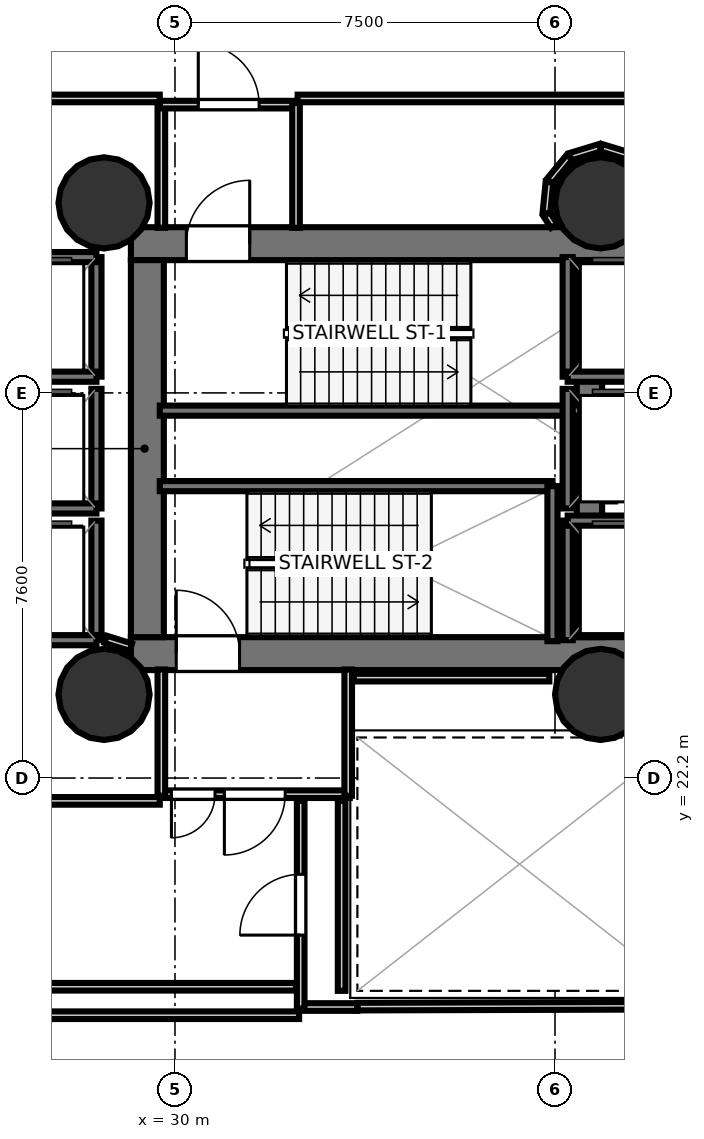
"""IFC4 building model, lengths in metres.
Left out: names, types, materials, properties, quantities, classifications, styles, units other than length and angle.
Written with IfcOpenShell. Run it as: python <this file> out.ifc"""

import sys

from ifc_helpers import new_model, si_unit, direction, frame, frame_2d, origin, origin_2d, place, context, subcontext, project, spatial, rectangle, hollow_circle, extrude, element, fill, save


model = new_model("IFC4")
c1 = context("Model", 3, precision=1e-05, world=origin(), true_north=direction((0.0, 1.0)))
c2 = subcontext(c1, "Body", "Model", "MODEL_VIEW")
j1 = project(units=[si_unit("LENGTHUNIT", "METRE"), si_unit("PLANEANGLEUNIT", "RADIAN")], contexts=[c1])
p1 = place(None, origin())
s1 = spatial("IfcSite", under=j1, at=p1, CompositionType="ELEMENT")
p2 = place(p1, origin())
s2 = spatial("IfcBuilding", under=s1, at=p2, CompositionType="ELEMENT")
p3 = place(p2, frame((0.0, 0.0, 47.9)))
s3 = spatial("IfcBuildingStorey", under=s2, at=p3, CompositionType="ELEMENT", Elevation=47.9)
p4 = place(p3, frame((29.13, 32.745, 0.0), z_axis=(0.0, 0.0, 1.0), x_axis=(1.0, 0.0, 0.0)))
e1 = element("IfcWall", 1, at=p4, inside=s3, PredefinedType="SHEAR", context=c2, shape_type="SweptSolid", body=[
    extrude(rectangle(XDim=10.72, YDim=0.65, at=frame_2d((5.36, 0.0))), origin(), (0.0, 0.0, 1.0), 4.42),
])
p5 = place(p4, frame((1.095, 0.0, 0.0)))
e2 = element("IfcOpeningElement", 2, at=p5, cuts=e1, PredefinedType="OPENING", context=c2, shape_type="SweptSolid", body=[
    extrude(rectangle(XDim=1.25, YDim=2.15, at=frame_2d((0.625, 1.075))), frame((0.0, 0.335, 0.0), z_axis=(0.0, -1.0, 0.0), x_axis=(1.0, 0.0, 0.0)), (0.0, 0.0, 1.0), 0.67),
])
p6 = place(p3, frame((29.13, 24.655, 0.0), z_axis=(0.0, 0.0, 1.0), x_axis=(1.0, 0.0, 0.0)))
e3 = element("IfcWall", 3, at=p6, inside=s3, PredefinedType="SHEAR", context=c2, shape_type="SweptSolid", body=[
    extrude(rectangle(XDim=10.72, YDim=0.65, at=frame_2d((5.36, 0.0))), origin(), (0.0, 0.0, 1.0), 4.42),
])
p7 = place(p6, frame((0.895, 0.0, 0.0)))
e4 = element("IfcOpeningElement", 4, at=p7, cuts=e3, PredefinedType="OPENING", context=c2, shape_type="SweptSolid", body=[
    extrude(rectangle(XDim=1.25, YDim=2.15, at=frame_2d((0.625, 1.075))), frame((0.0, 0.335, 0.0), z_axis=(0.0, -1.0, 0.0), x_axis=(1.0, 0.0, 0.0)), (0.0, 0.0, 1.0), 0.67),
])
p8 = place(p3, frame((29.455, 24.98, 0.0), z_axis=(0.0, 0.0, 1.0), x_axis=(0.0, 1.0, 0.0)))
e5 = element("IfcWall", 5, at=p8, inside=s3, PredefinedType="SHEAR", context=c2, shape_type="SweptSolid", body=[
    extrude(rectangle(XDim=7.44, YDim=0.65, at=frame_2d((3.72, 0.0))), origin(), (0.0, 0.0, 1.0), 4.42),
])
p9 = place(p3, frame((38.18, 24.98, 0.0), z_axis=(0.0, 0.0, 1.0), x_axis=(0.0, 1.0, 0.0)))
e6 = element("IfcWall", 6, at=p9, inside=s3, PredefinedType="SHEAR", context=c2, shape_type="SweptSolid", body=[
    extrude(rectangle(XDim=7.44, YDim=0.5, at=frame_2d((3.72, 0.0))), origin(), (0.0, 0.0, 1.0), 4.42),
])
for number, where, z_axis, x_axis in (
    (7, (28.6, 33.55, 0.0), (0.0, 0.0, 1.0), (1.0, 0.0, 0.0)),
    (8, (28.6, 23.85, 0.0), (0.0, 0.0, 1.0), (1.0, 0.0, 0.0)),
    (9, (38.4, 33.55, 0.0), (0.0, 0.0, 1.0), (1.0, 0.0, 0.0)),
    (10, (38.4, 23.85, 0.0), (0.0, 0.0, 1.0), (1.0, 0.0, 0.0)),
):
    element("IfcColumn", number, at=place(p3, frame(where, z_axis=z_axis, x_axis=x_axis)), inside=s3, PredefinedType="COLUMN", context=c2, shape_type="SweptSolid", body=[
        extrude(hollow_circle(Radius=0.9, WallThickness=0.045, at=origin_2d()), origin(), (0.0, 0.0, 1.0), 4.6),
    ])
p10 = place(p3, frame((29.7, 29.45, 0.0), z_axis=(0.0, 0.0, 1.0), x_axis=(1.0, 0.0, 0.0)))
e11 = element("IfcWall", 11, at=p10, inside=s3, PredefinedType="SOLIDWALL", context=c2, shape_type="SweptSolid", body=[
    extrude(rectangle(XDim=8.3, YDim=0.2, at=frame_2d((4.15, 0.0))), origin(), (0.0, 0.0, 1.0), 4.42),
])
p11 = place(p3, frame((29.7, 27.96, 0.0), z_axis=(0.0, 0.0, 1.0), x_axis=(1.0, 0.0, 0.0)))
e12 = element("IfcWall", 12, at=p11, inside=s3, PredefinedType="SOLIDWALL", context=c2, shape_type="SweptSolid", body=[
    extrude(rectangle(XDim=7.75, YDim=0.2, at=frame_2d((3.875, 0.0))), origin(), (0.0, 0.0, 1.0), 4.42),
])
p12 = place(p3, frame((37.45, 24.9, 0.0), z_axis=(0.0, 0.0, 1.0), x_axis=(0.0, 1.0, 0.0)))
e13 = element("IfcWall", 13, at=p12, inside=s3, PredefinedType="SOLIDWALL", context=c2, shape_type="SweptSolid", body=[
    extrude(rectangle(XDim=3.06, YDim=0.2, at=frame_2d((1.53, 0.0))), origin(), (0.0, 0.0, 1.0), 4.42),
])
p13 = place(p3, frame((37.75, 30.12, 0.0), z_axis=(0.0, 0.0, 1.0), x_axis=(0.0, 1.0, 0.0)))
e14 = element("IfcWall", 14, at=p13, inside=s3, PredefinedType="SOLIDWALL", context=c2, shape_type="SweptSolid", body=[
    extrude(rectangle(XDim=2.36, YDim=0.2, at=frame_2d((1.18, 0.0))), origin(), (0.0, 0.0, 1.0), 4.42),
])
p14 = place(p3, frame((37.75, 30.12, 0.0), z_axis=(0.0, 0.0, 1.0), x_axis=(1.0, 0.0, 0.0)))
e15 = element("IfcWall", 15, at=p14, inside=s3, PredefinedType="SOLIDWALL", context=c2, shape_type="SweptSolid", body=[
    extrude(rectangle(XDim=2.1, YDim=0.2, at=frame_2d((1.05, 0.0))), origin(), (0.0, 0.0, 1.0), 4.42),
])
p15 = place(p3, frame((37.75, 24.92, 0.0), z_axis=(0.0, 0.0, 1.0), x_axis=(0.0, 1.0, 0.0)))
e16 = element("IfcWall", 16, at=p15, inside=s3, PredefinedType="SOLIDWALL", context=c2, shape_type="SweptSolid", body=[
    extrude(rectangle(XDim=2.36, YDim=0.2, at=frame_2d((1.18, 0.0))), origin(), (0.0, 0.0, 1.0), 4.42),
])
p16 = place(p3, frame((37.75, 27.28, 0.0), z_axis=(0.0, 0.0, 1.0), x_axis=(1.0, 0.0, 0.0)))
e17 = element("IfcWall", 17, at=p16, inside=s3, PredefinedType="SOLIDWALL", context=c2, shape_type="SweptSolid", body=[
    extrude(rectangle(XDim=2.1, YDim=0.2, at=frame_2d((1.05, 0.0))), origin(), (0.0, 0.0, 1.0), 4.42),
])
p17 = place(p3, frame((28.45, 30.12, 0.0), z_axis=(0.0, 0.0, 1.0), x_axis=(0.0, 1.0, 0.0)))
e18 = element("IfcWall", 18, at=p17, inside=s3, PredefinedType="SOLIDWALL", context=c2, shape_type="SweptSolid", body=[
    extrude(rectangle(XDim=2.36, YDim=0.2, at=frame_2d((1.18, 0.0))), origin(), (0.0, 0.0, 1.0), 4.42),
])
for number, where, z_axis, x_axis in (
    (19, (26.35, 32.48, 0.0), (0.0, 0.0, 1.0), (1.0, 0.0, 0.0)),
    (20, (26.35, 30.12, 0.0), (0.0, 0.0, 1.0), (1.0, 0.0, 0.0)),
):
    element("IfcWall", number, at=place(p3, frame(where, z_axis=z_axis, x_axis=x_axis)), inside=s3, PredefinedType="SOLIDWALL", context=c2, shape_type="SweptSolid", body=[
        extrude(rectangle(XDim=2.1, YDim=0.2, at=frame_2d((1.05, 0.0))), origin(), (0.0, 0.0, 1.0), 4.42),
    ])
p18 = place(p3, frame((28.45, 27.52, 0.0), z_axis=(0.0, 0.0, 1.0), x_axis=(0.0, 1.0, 0.0)))
e21 = element("IfcWall", 21, at=p18, inside=s3, PredefinedType="SOLIDWALL", context=c2, shape_type="SweptSolid", body=[
    extrude(rectangle(XDim=2.36, YDim=0.2, at=frame_2d((1.18, 0.0))), origin(), (0.0, 0.0, 1.0), 4.42),
])
p19 = place(p3, frame((26.35, 27.52, 0.0), z_axis=(0.0, 0.0, 1.0), x_axis=(1.0, 0.0, 0.0)))
e22 = element("IfcWall", 22, at=p19, inside=s3, PredefinedType="SOLIDWALL", context=c2, shape_type="SweptSolid", body=[
    extrude(rectangle(XDim=2.1, YDim=0.2, at=frame_2d((1.05, 0.0))), origin(), (0.0, 0.0, 1.0), 4.42),
])
p20 = place(p3, frame((28.45, 24.92, 0.0), z_axis=(0.0, 0.0, 1.0), x_axis=(0.0, 1.0, 0.0)))
e23 = element("IfcWall", 23, at=p20, inside=s3, PredefinedType="SOLIDWALL", context=c2, shape_type="SweptSolid", body=[
    extrude(rectangle(XDim=2.36, YDim=0.2, at=frame_2d((1.18, 0.0))), origin(), (0.0, 0.0, 1.0), 4.42),
])
p21 = place(p3, frame((26.35, 24.92, 0.0), z_axis=(0.0, 0.0, 1.0), x_axis=(1.0, 0.0, 0.0)))
e24 = element("IfcWall", 24, at=p21, inside=s3, PredefinedType="SOLIDWALL", context=c2, shape_type="SweptSolid", body=[
    extrude(rectangle(XDim=2.1, YDim=0.2, at=frame_2d((1.05, 0.0))), origin(), (0.0, 0.0, 1.0), 4.42),
])
p22 = place(p3, frame((37.75, 27.52, 0.0), z_axis=(0.0, 0.0, 1.0), x_axis=(0.0, 1.0, 0.0)))
e25 = element("IfcWall", 25, at=p22, inside=s3, PredefinedType="SOLIDWALL", context=c2, shape_type="SweptSolid", body=[
    extrude(rectangle(XDim=2.36, YDim=0.2, at=frame_2d((1.18, 0.0))), origin(), (0.0, 0.0, 1.0), 4.42),
])
p23 = place(p3, frame((29.731, 33.058, 0.0), z_axis=(0.0, 0.0, 1.0), x_axis=(0.0, 1.0, 0.0)))
e26 = element("IfcWall", 26, at=p23, inside=s3, PredefinedType="PARTITIONING", context=c2, shape_type="SweptSolid", body=[
    extrude(rectangle(XDim=2.462, YDim=0.15, at=frame_2d((1.231, 0.0))), origin(), (0.0, 0.0, 1.0), 2.94),
])
p24 = place(p3, frame((29.7, 35.489, 0.0), z_axis=(0.0, 0.0, 1.0), x_axis=(1.0, 0.0, 0.0)))
e27 = element("IfcWall", 27, at=p24, inside=s3, PredefinedType="PARTITIONING", context=c2, shape_type="SweptSolid", body=[
    extrude(rectangle(XDim=2.72, YDim=0.15, at=frame_2d((1.36, 0.0))), origin(), (0.0, 0.0, 1.0), 2.94),
])
p25 = place(p24, frame((0.76, 0.0, 0.0)))
e28 = element("IfcOpeningElement", 28, at=p25, cuts=e27, PredefinedType="OPENING", context=c2, shape_type="SweptSolid", body=[
    extrude(rectangle(XDim=1.2, YDim=2.15, at=frame_2d((0.6, 1.075))), frame((0.0, 0.085, 0.0), z_axis=(0.0, -1.0, 0.0), x_axis=(1.0, 0.0, 0.0)), (0.0, 0.0, 1.0), 0.17),
])
p26 = place(p3, frame((32.389, 35.52, 0.0), z_axis=(0.0, 0.0, 1.0), x_axis=(0.0, -1.0, 0.0)))
e29 = element("IfcWall", 29, at=p26, inside=s3, PredefinedType="PARTITIONING", context=c2, shape_type="SweptSolid", body=[
    extrude(rectangle(XDim=2.462, YDim=0.15, at=frame_2d((1.231, 0.0))), origin(), (0.0, 0.0, 1.0), 2.94),
])
p27 = place(p3, frame((33.45, 21.881, 0.0), z_axis=(0.0, 0.0, 1.0), x_axis=(-1.0, 0.0, 0.0)))
e30 = element("IfcWall", 30, at=p27, inside=s3, PredefinedType="PARTITIONING", context=c2, shape_type="SweptSolid", body=[
    extrude(rectangle(XDim=3.75, YDim=0.15, at=frame_2d((1.875, 0.0))), origin(), (0.0, 0.0, 1.0), 2.94),
])
p28 = place(p27, frame((1.275, 0.0, 0.0)))
e31 = element("IfcOpeningElement", 31, at=p28, cuts=e30, PredefinedType="OPENING", context=c2, shape_type="SweptSolid", body=[
    extrude(rectangle(XDim=1.2, YDim=2.15, at=frame_2d((0.6, 1.075))), frame((0.0, 0.085, 0.0), z_axis=(0.0, -1.0, 0.0), x_axis=(1.0, 0.0, 0.0)), (0.0, 0.0, 1.0), 0.17),
])
p29 = place(p27, frame((2.66, 0.0, 0.0)))
e32 = element("IfcOpeningElement", 32, at=p29, cuts=e30, PredefinedType="OPENING", context=c2, shape_type="SweptSolid", body=[
    extrude(rectangle(XDim=0.86, YDim=2.05, at=frame_2d((0.43, 1.025))), frame((0.0, 0.085, 0.0), z_axis=(0.0, -1.0, 0.0), x_axis=(1.0, 0.0, 0.0)), (0.0, 0.0, 1.0), 0.17),
])
for number, where, z_axis, x_axis in (
    (33, (29.731, 21.85, 0.0), (0.0, 0.0, 1.0), (0.0, 1.0, 0.0)),
    (34, (33.419, 24.342, 0.0), (0.0, 0.0, 1.0), (0.0, -1.0, 0.0)),
):
    element("IfcWall", number, at=place(p3, frame(where, z_axis=z_axis, x_axis=x_axis)), inside=s3, PredefinedType="PARTITIONING", context=c2, shape_type="SweptSolid", body=[
        extrude(rectangle(XDim=2.492, YDim=0.15, at=frame_2d((1.246, 0.0))), origin(), (0.0, 0.0, 1.0), 2.94),
    ])
p30 = place(p3, frame((29.13, 24.782, 0.0), z_axis=(0.0, 0.0, 1.0), x_axis=(-0.955000482512, 0.296604245422, 0.0)))
e35 = element("IfcWall", 35, at=p30, inside=s3, PredefinedType="PARTITIONING", context=c2, shape_type="SweptSolid", body=[
    extrude(rectangle(XDim=0.524, YDim=0.15, at=frame_2d((0.262, 0.0))), origin(), (0.0, 0.0, 1.0), 2.94),
])
p31 = place(p3, frame((37.389, 24.181, 0.0), z_axis=(0.0, 0.0, 1.0), x_axis=(-1.0, 0.0, 0.0)))
e36 = element("IfcWall", 36, at=p31, inside=s3, PredefinedType="PARTITIONING", context=c2, shape_type="SweptSolid", body=[
    extrude(rectangle(XDim=3.859, YDim=0.15, at=frame_2d((1.929, 0.0))), origin(), (0.0, 0.0, 1.0), 2.94),
])
p32 = place(p3, frame((33.6, 17.689, 0.0), z_axis=(0.0, 0.0, 1.0), x_axis=(0.999995817826, 0.002892115308, 0.0)))
e37 = element("IfcWall", 37, at=p32, inside=s3, PredefinedType="PARTITIONING", context=c2, shape_type="SweptSolid", body=[
    extrude(rectangle(XDim=6.5, YDim=0.15, at=frame_2d((3.25, 0.0))), origin(), (0.0, 0.0, 1.0), 2.94),
])
p33 = place(p3, frame((33.6, 17.681, 0.0), z_axis=(0.0, 0.0, 1.0), x_axis=(-1.0, 0.0, 0.0)))
e38 = element("IfcWall", 38, at=p33, inside=s3, PredefinedType="PARTITIONING", context=c2, shape_type="SweptSolid", body=[
    extrude(rectangle(XDim=1.15, YDim=0.15, at=frame_2d((0.575, 0.0))), origin(), (0.0, 0.0, 1.0), 2.94),
])
p34 = place(p3, frame((32.481, 17.65, 0.0), z_axis=(0.0, 0.0, 1.0), x_axis=(0.0, 1.0, 0.0)))
e39 = element("IfcWall", 39, at=p34, inside=s3, PredefinedType="PARTITIONING", context=c2, shape_type="SweptSolid", body=[
    extrude(rectangle(XDim=4.1, YDim=0.15, at=frame_2d((2.05, 0.0))), origin(), (0.0, 0.0, 1.0), 2.94),
])
p35 = place(p34, frame((1.45, 0.0, 0.0)))
e40 = element("IfcOpeningElement", 40, at=p35, cuts=e39, PredefinedType="OPENING", context=c2, shape_type="SweptSolid", body=[
    extrude(rectangle(XDim=1.2, YDim=2.15, at=frame_2d((0.6, 1.075))), frame((0.0, 0.085, 0.0), z_axis=(0.0, -1.0, 0.0), x_axis=(1.0, 0.0, 0.0)), (0.0, 0.0, 1.0), 0.17),
])
p36 = place(p3, frame((33.289, 21.75, 0.0), z_axis=(0.0, 0.0, 1.0), x_axis=(0.0, -1.0, 0.0)))
e41 = element("IfcWall", 41, at=p36, inside=s3, PredefinedType="PARTITIONING", context=c2, shape_type="SweptSolid", body=[
    extrude(rectangle(XDim=3.75, YDim=0.15, at=frame_2d((1.875, 0.0))), origin(), (0.0, 0.0, 1.0), 2.94),
])
p37 = place(p3, frame((39.818, 35.611, 0.0), z_axis=(0.0, 0.0, 1.0), x_axis=(-1.0, 0.0, 0.0)))
e42 = element("IfcWall", 42, at=p37, inside=s3, PredefinedType="PARTITIONING", context=c2, shape_type="SweptSolid", body=[
    extrude(rectangle(XDim=7.398, YDim=0.15, at=frame_2d((3.699, 0.0))), origin(), (0.0, 0.0, 1.0), 2.94),
])
for number, where, z_axis, x_axis in (
    (43, (29.7, 35.611, 0.0), (0.0, 0.0, 1.0), (-1.0, 0.0, 0.0)),
    (44, (26.45, 21.749, 0.0), (0.0, 0.0, 1.0), (1.0, 0.0, 0.0)),
):
    element("IfcWall", number, at=place(p3, frame(where, z_axis=z_axis, x_axis=x_axis)), inside=s3, PredefinedType="PARTITIONING", context=c2, shape_type="SweptSolid", body=[
        extrude(rectangle(XDim=3.25, YDim=0.15, at=frame_2d((1.625, 0.0))), origin(), (0.0, 0.0, 1.0), 2.94),
    ])
p38 = place(p3, frame((32.388, 18.081, 0.0), z_axis=(0.0, 0.0, 1.0), x_axis=(-1.0, 0.0, 0.0)))
e45 = element("IfcWall", 45, at=p38, inside=s3, PredefinedType="PARTITIONING", context=c2, shape_type="SweptSolid", body=[
    extrude(rectangle(XDim=5.938, YDim=0.15, at=frame_2d((2.969, 0.0))), origin(), (0.0, 0.0, 1.0), 2.94),
])
p39 = place(p3, frame((26.45, 17.519, 0.0), z_axis=(0.0, 0.0, 1.0), x_axis=(1.0, 0.0, 0.0)))
e46 = element("IfcWall", 46, at=p39, inside=s3, PredefinedType="PARTITIONING", context=c2, shape_type="SweptSolid", body=[
    extrude(rectangle(XDim=6.0, YDim=0.15, at=frame_2d((3.0, 0.0))), origin(), (0.0, 0.0, 1.0), 2.94),
])
p40 = place(p3, frame((38.998, 34.461, 0.0), z_axis=(0.0, 0.0, 1.0), x_axis=(-0.956904203315, 0.290403763195, 0.0)))
e47 = element("IfcWall", 47, at=p40, inside=s3, PredefinedType="PARTITIONING", context=c2, shape_type="SweptSolid", body=[
    extrude(rectangle(XDim=0.615, YDim=0.15, at=frame_2d((0.308, 0.0))), origin(), (0.0, 0.0, 1.0), 2.94),
])
p41 = place(p3, frame((38.391, 34.64, 0.0), z_axis=(0.0, 0.0, 1.0), x_axis=(-0.956937641938, -0.290293557355, 0.0)))
e48 = element("IfcWall", 48, at=p41, inside=s3, PredefinedType="PARTITIONING", context=c2, shape_type="SweptSolid", body=[
    extrude(rectangle(XDim=0.616, YDim=0.15, at=frame_2d((0.308, 0.0))), origin(), (0.0, 0.0, 1.0), 2.94),
])
p42 = place(p3, frame((37.787, 34.451, 0.0), z_axis=(0.0, 0.0, 1.0), x_axis=(-0.634468611637, -0.77294862756, 0.0)))
e49 = element("IfcWall", 49, at=p42, inside=s3, PredefinedType="PARTITIONING", context=c2, shape_type="SweptSolid", body=[
    extrude(rectangle(XDim=0.615, YDim=0.15, at=frame_2d((0.308, 0.0))), origin(), (0.0, 0.0, 1.0), 2.94),
])
p43 = place(p3, frame((37.39, 33.959, 0.0), z_axis=(0.0, 0.0, 1.0), x_axis=(-0.09797199107, -0.995189172452, 0.0)))
e50 = element("IfcWall", 50, at=p43, inside=s3, PredefinedType="PARTITIONING", context=c2, shape_type="SweptSolid", body=[
    extrude(rectangle(XDim=0.615, YDim=0.15, at=frame_2d((0.308, 0.0))), origin(), (0.0, 0.0, 1.0), 2.94),
])
p44 = place(p3, frame((37.334, 33.326, 0.0), z_axis=(0.0, 0.0, 1.0), x_axis=(0.544613558839, -0.838687111817, 0.0)))
e51 = element("IfcWall", 51, at=p44, inside=s3, PredefinedType="PARTITIONING", context=c2, shape_type="SweptSolid", body=[
    extrude(rectangle(XDim=0.275, YDim=0.15, at=frame_2d((0.137, 0.0))), origin(), (0.0, 0.0, 1.0), 2.94),
])
p45 = place(p5, origin())
e52 = element("IfcDoor", 52, at=p45, inside=s3, OperationType="SINGLE_SWING_RIGHT", PredefinedType="DOOR", context=c2, shape_type="SweptSolid", body=[
    extrude(rectangle(XDim=1.25, YDim=2.15, at=frame_2d((0.625, 1.075))), frame((0.0, 0.025, 0.0), z_axis=(0.0, -1.0, 0.0), x_axis=(1.0, 0.0, 0.0)), (0.0, 0.0, 1.0), 0.05),
])
fill(e2, e52)
p46 = place(p7, origin())
e53 = element("IfcDoor", 53, at=p46, inside=s3, OperationType="SINGLE_SWING_LEFT", PredefinedType="DOOR", context=c2, shape_type="SweptSolid", body=[
    extrude(rectangle(XDim=1.25, YDim=2.15, at=frame_2d((0.625, 1.075))), frame((0.0, 0.025, 0.0), z_axis=(0.0, -1.0, 0.0), x_axis=(1.0, 0.0, 0.0)), (0.0, 0.0, 1.0), 0.05),
])
fill(e4, e53)
p47 = place(p25, origin())
e54 = element("IfcDoor", 54, at=p47, inside=s3, OperationType="SINGLE_SWING_LEFT", PredefinedType="DOOR", context=c2, shape_type="SweptSolid", body=[
    extrude(rectangle(XDim=1.2, YDim=2.15, at=frame_2d((0.6, 1.075))), frame((0.0, 0.025, 0.0), z_axis=(0.0, -1.0, 0.0), x_axis=(1.0, 0.0, 0.0)), (0.0, 0.0, 1.0), 0.05),
])
fill(e28, e54)
p48 = place(p28, origin())
e55 = element("IfcDoor", 55, at=p48, inside=s3, OperationType="SINGLE_SWING_RIGHT", PredefinedType="DOOR", context=c2, shape_type="SweptSolid", body=[
    extrude(rectangle(XDim=1.2, YDim=2.15, at=frame_2d((0.6, 1.075))), frame((0.0, 0.025, 0.0), z_axis=(0.0, -1.0, 0.0), x_axis=(1.0, 0.0, 0.0)), (0.0, 0.0, 1.0), 0.05),
])
fill(e31, e55)
p49 = place(p35, origin())
e56 = element("IfcDoor", 56, at=p49, inside=s3, OperationType="SINGLE_SWING_LEFT", PredefinedType="DOOR", context=c2, shape_type="SweptSolid", body=[
    extrude(rectangle(XDim=1.2, YDim=2.15, at=frame_2d((0.6, 1.075))), frame((0.0, 0.025, 0.0), z_axis=(0.0, -1.0, 0.0), x_axis=(1.0, 0.0, 0.0)), (0.0, 0.0, 1.0), 0.05),
])
fill(e40, e56)
p50 = place(p29, origin())
e57 = element("IfcDoor", 57, at=p50, inside=s3, OperationType="SINGLE_SWING_RIGHT", PredefinedType="DOOR", context=c2, shape_type="SweptSolid", body=[
    extrude(rectangle(XDim=0.86, YDim=2.05, at=frame_2d((0.43, 1.025))), frame((0.0, 0.025, 0.0), z_axis=(0.0, -1.0, 0.0), x_axis=(1.0, 0.0, 0.0)), (0.0, 0.0, 1.0), 0.05),
])
fill(e32, e57)
save(model, sys.argv[1])
